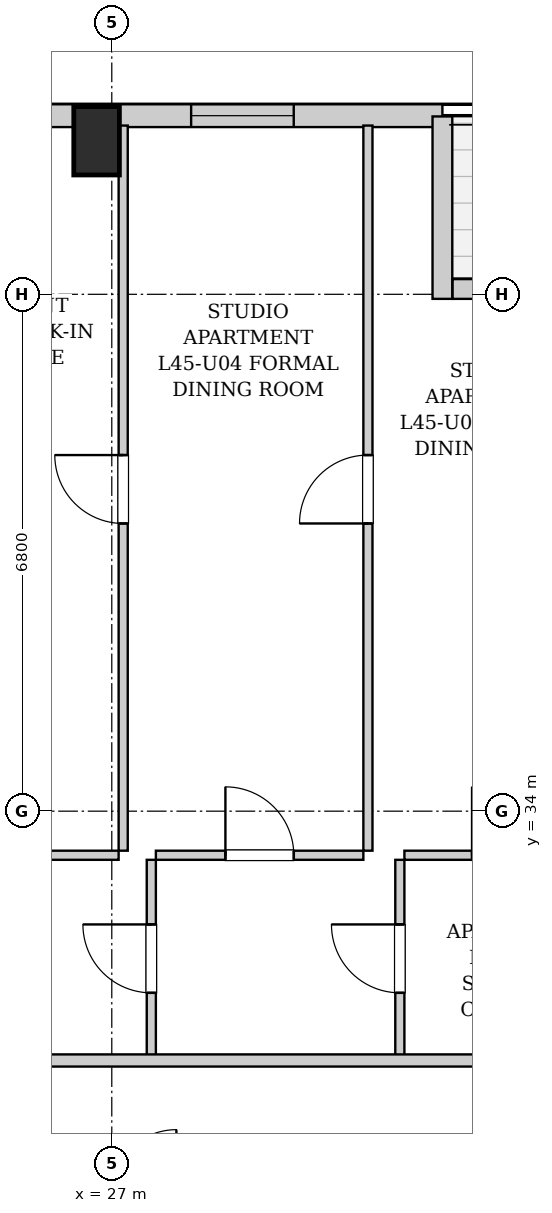
"""IFC4 building model, lengths in metres.
Left out: names, types, materials, properties, quantities, classifications, styles, units other than length and angle.
Written with IfcOpenShell. Run it as: python <this file> out.ifc"""

import sys

from ifc_helpers import new_model, si_unit, direction, frame, frame_2d, origin, origin_2d, place, context, subcontext, project, spatial, rectangle, extrude, element, fill, save


model = new_model("IFC4")
c1 = context("Model", 3, precision=1e-05, world=origin(), true_north=direction((0.0, 1.0)))
c2 = subcontext(c1, "Body", "Model", "MODEL_VIEW")
j1 = project(units=[si_unit("LENGTHUNIT", "METRE"), si_unit("PLANEANGLEUNIT", "RADIAN")], contexts=[c1])
p1 = place(None, origin())
s1 = spatial("IfcSite", under=j1, at=p1, CompositionType="ELEMENT")
p2 = place(p1, origin())
s2 = spatial("IfcBuilding", under=s1, at=p2, CompositionType="ELEMENT")
p3 = place(p2, frame((0.0, 0.0, 156.9)))
s3 = spatial("IfcBuildingStorey", under=s2, at=p3, CompositionType="ELEMENT", Elevation=156.9)
p4 = place(p3, frame((26.8, 42.82, 0.0), z_axis=(0.0, 0.0, 1.0), x_axis=(1.0, 0.0, 0.0)))
e1 = element("IfcColumn", 1, at=p4, inside=s3, PredefinedType="COLUMN", context=c2, shape_type="SweptSolid", body=[
    extrude(rectangle(XDim=0.6, YDim=0.9, at=origin_2d()), origin(), (0.0, 0.0, 1.0), 3.25),
])
p5 = place(p3, frame((10.0, 43.15, 0.0), z_axis=(0.0, 0.0, 1.0), x_axis=(1.0, 0.0, 0.0)))
e2 = element("IfcWall", 2, at=p5, inside=s3, PredefinedType="SOLIDWALL", context=c2, shape_type="SweptSolid", body=[
    extrude(rectangle(XDim=21.35, YDim=0.3, at=frame_2d((10.675, 0.0))), origin(), (0.0, 0.0, 1.0), 2.99),
])
p6 = place(p5, frame((1.956, 0.0, 0.55)))
e3 = element("IfcOpeningElement", 3, at=p6, cuts=e2, PredefinedType="OPENING", context=c2, shape_type="SweptSolid", body=[
    extrude(rectangle(XDim=1.35, YDim=1.2, at=frame_2d((0.675, 0.6))), frame((0.0, 0.16, 0.0), z_axis=(0.0, -1.0, 0.0), x_axis=(1.0, 0.0, 0.0)), (0.0, 0.0, 1.0), 0.32),
])
p7 = place(p5, frame((5.189, 0.0, 0.55)))
e4 = element("IfcOpeningElement", 4, at=p7, cuts=e2, PredefinedType="OPENING", context=c2, shape_type="SweptSolid", body=[
    extrude(rectangle(XDim=1.35, YDim=1.2, at=frame_2d((0.675, 0.6))), frame((0.0, 0.16, 0.0), z_axis=(0.0, -1.0, 0.0), x_axis=(1.0, 0.0, 0.0)), (0.0, 0.0, 1.0), 0.32),
])
p8 = place(p5, frame((8.421, 0.0, 0.55)))
e5 = element("IfcOpeningElement", 5, at=p8, cuts=e2, PredefinedType="OPENING", context=c2, shape_type="SweptSolid", body=[
    extrude(rectangle(XDim=1.35, YDim=1.2, at=frame_2d((0.675, 0.6))), frame((0.0, 0.16, 0.0), z_axis=(0.0, -1.0, 0.0), x_axis=(1.0, 0.0, 0.0)), (0.0, 0.0, 1.0), 0.32),
])
p9 = place(p5, frame((11.15, 0.0, 0.55)))
e6 = element("IfcOpeningElement", 6, at=p9, cuts=e2, PredefinedType="OPENING", context=c2, shape_type="SweptSolid", body=[
    extrude(rectangle(XDim=1.35, YDim=1.2, at=frame_2d((0.675, 0.6))), frame((0.0, 0.16, 0.0), z_axis=(0.0, -1.0, 0.0), x_axis=(1.0, 0.0, 0.0)), (0.0, 0.0, 1.0), 0.32),
])
p10 = place(p5, frame((18.044, 0.0, 0.55)))
e7 = element("IfcOpeningElement", 7, at=p10, cuts=e2, PredefinedType="OPENING", context=c2, shape_type="SweptSolid", body=[
    extrude(rectangle(XDim=1.35, YDim=1.2, at=frame_2d((0.675, 0.6))), frame((0.0, 0.16, 0.0), z_axis=(0.0, -1.0, 0.0), x_axis=(1.0, 0.0, 0.0)), (0.0, 0.0, 1.0), 0.32),
])
p11 = place(p3, frame((31.35, 43.14, 0.0), z_axis=(0.0, 0.0, 1.0), x_axis=(0.0, -1.0, 0.0)))
e8 = element("IfcWall", 8, at=p11, inside=s3, PredefinedType="SOLIDWALL", context=c2, shape_type="SweptSolid", body=[
    extrude(rectangle(XDim=2.4, YDim=0.26, at=frame_2d((1.2, 0.0))), origin(), (0.0, 0.0, 1.0), 2.99),
])
p12 = place(p3, frame((31.484, 40.87, 0.0), z_axis=(0.0, 0.0, 1.0), x_axis=(1.0, 0.0, 0.0)))
e9 = element("IfcWall", 9, at=p12, inside=s3, PredefinedType="SOLIDWALL", context=c2, shape_type="SweptSolid", body=[
    extrude(rectangle(XDim=4.882, YDim=0.26, at=frame_2d((2.441, 0.0))), origin(), (0.0, 0.0, 1.0), 2.99),
])
p13 = place(p12, frame((2.246, 0.0, 0.0)))
e10 = element("IfcOpeningElement", 10, at=p13, cuts=e9, PredefinedType="OPENING", context=c2, shape_type="SweptSolid", body=[
    extrude(rectangle(XDim=1.1, YDim=2.0, at=frame_2d((0.55, 1.0))), frame((0.0, 0.14, 0.0), z_axis=(0.0, -1.0, 0.0), x_axis=(1.0, 0.0, 0.0)), (0.0, 0.0, 1.0), 0.28),
])
p14 = place(p12, frame((0.536, 0.0, 0.55)))
e11 = element("IfcOpeningElement", 11, at=p14, cuts=e9, PredefinedType="OPENING", context=c2, shape_type="SweptSolid", body=[
    extrude(rectangle(XDim=1.35, YDim=1.2, at=frame_2d((0.675, 0.6))), frame((0.0, 0.14, 0.0), z_axis=(0.0, -1.0, 0.0), x_axis=(1.0, 0.0, 0.0)), (0.0, 0.0, 1.0), 0.28),
])
p15 = place(p3, frame((27.52, 30.76, 0.0), z_axis=(0.0, 0.0, 1.0), x_axis=(0.0, 1.0, 0.0)))
e12 = element("IfcWall", 12, at=p15, inside=s3, PredefinedType="PARTITIONING", context=c2, shape_type="SweptSolid", body=[
    extrude(rectangle(XDim=2.6, YDim=0.12, at=frame_2d((1.3, 0.0))), origin(), (0.0, 0.0, 1.0), 2.99),
])
p16 = place(p15, frame((0.85, 0.0, 0.0)))
e13 = element("IfcOpeningElement", 13, at=p16, cuts=e12, PredefinedType="OPENING", context=c2, shape_type="SweptSolid", body=[
    extrude(rectangle(XDim=0.9, YDim=2.05, at=frame_2d((0.45, 1.025))), frame((0.0, 0.07, 0.0), z_axis=(0.0, -1.0, 0.0), x_axis=(1.0, 0.0, 0.0)), (0.0, 0.0, 1.0), 0.14),
])
p17 = place(p3, frame((23.99, 33.42, 0.0), z_axis=(0.0, 0.0, 1.0), x_axis=(1.0, 0.0, 0.0)))
e14 = element("IfcWall", 14, at=p17, inside=s3, PredefinedType="PARTITIONING", context=c2, shape_type="SweptSolid", body=[
    extrude(rectangle(XDim=3.1, YDim=0.12, at=frame_2d((1.55, 0.0))), origin(), (0.0, 0.0, 1.0), 2.99),
])
p18 = place(p17, frame((1.1, 0.0, 0.0)))
e15 = element("IfcOpeningElement", 15, at=p18, cuts=e14, PredefinedType="OPENING", context=c2, shape_type="SweptSolid", body=[
    extrude(rectangle(XDim=0.9, YDim=2.05, at=frame_2d((0.45, 1.025))), frame((0.0, 0.07, 0.0), z_axis=(0.0, -1.0, 0.0), x_axis=(1.0, 0.0, 0.0)), (0.0, 0.0, 1.0), 0.14),
])
p19 = place(p3, frame((30.79, 30.76, 0.0), z_axis=(0.0, 0.0, 1.0), x_axis=(0.0, 1.0, 0.0)))
e16 = element("IfcWall", 16, at=p19, inside=s3, PredefinedType="PARTITIONING", context=c2, shape_type="SweptSolid", body=[
    extrude(rectangle(XDim=2.6, YDim=0.12, at=frame_2d((1.3, 0.0))), origin(), (0.0, 0.0, 1.0), 2.99),
])
p20 = place(p19, frame((0.85, 0.0, 0.0)))
e17 = element("IfcOpeningElement", 17, at=p20, cuts=e16, PredefinedType="OPENING", context=c2, shape_type="SweptSolid", body=[
    extrude(rectangle(XDim=0.9, YDim=2.05, at=frame_2d((0.45, 1.025))), frame((0.0, 0.07, 0.0), z_axis=(0.0, -1.0, 0.0), x_axis=(1.0, 0.0, 0.0)), (0.0, 0.0, 1.0), 0.14),
])
p21 = place(p3, frame((27.58, 33.42, 0.0), z_axis=(0.0, 0.0, 1.0), x_axis=(1.0, 0.0, 0.0)))
e18 = element("IfcWall", 18, at=p21, inside=s3, PredefinedType="PARTITIONING", context=c2, shape_type="SweptSolid", body=[
    extrude(rectangle(XDim=2.73, YDim=0.12, at=frame_2d((1.365, 0.0))), origin(), (0.0, 0.0, 1.0), 2.99),
])
p22 = place(p21, frame((0.915, 0.0, 0.0)))
e19 = element("IfcOpeningElement", 19, at=p22, cuts=e18, PredefinedType="OPENING", context=c2, shape_type="SweptSolid", body=[
    extrude(rectangle(XDim=0.9, YDim=2.05, at=frame_2d((0.45, 1.025))), frame((0.0, 0.07, 0.0), z_axis=(0.0, -1.0, 0.0), x_axis=(1.0, 0.0, 0.0)), (0.0, 0.0, 1.0), 0.14),
])
p23 = place(p3, frame((30.85, 33.42, 0.0), z_axis=(0.0, 0.0, 1.0), x_axis=(1.0, 0.0, 0.0)))
e20 = element("IfcWall", 20, at=p23, inside=s3, PredefinedType="PARTITIONING", context=c2, shape_type="SweptSolid", body=[
    extrude(rectangle(XDim=2.68, YDim=0.12, at=frame_2d((1.34, 0.0))), origin(), (0.0, 0.0, 1.0), 2.99),
])
p24 = place(p23, frame((0.89, 0.0, 0.0)))
e21 = element("IfcOpeningElement", 21, at=p24, cuts=e20, PredefinedType="OPENING", context=c2, shape_type="SweptSolid", body=[
    extrude(rectangle(XDim=0.9, YDim=2.05, at=frame_2d((0.45, 1.025))), frame((0.0, 0.07, 0.0), z_axis=(0.0, -1.0, 0.0), x_axis=(1.0, 0.0, 0.0)), (0.0, 0.0, 1.0), 0.14),
])
p25 = place(p3, frame((27.15, 33.48, 0.0), z_axis=(0.0, 0.0, 1.0), x_axis=(0.0, 1.0, 0.0)))
e22 = element("IfcWall", 22, at=p25, inside=s3, PredefinedType="PARTITIONING", context=c2, shape_type="SweptSolid", body=[
    extrude(rectangle(XDim=9.54, YDim=0.12, at=frame_2d((4.77, 0.0))), origin(), (0.0, 0.0, 1.0), 2.99),
])
p26 = place(p25, frame((4.305, 0.0, 0.0)))
e23 = element("IfcOpeningElement", 23, at=p26, cuts=e22, PredefinedType="OPENING", context=c2, shape_type="SweptSolid", body=[
    extrude(rectangle(XDim=0.9, YDim=2.05, at=frame_2d((0.45, 1.025))), frame((0.0, 0.07, 0.0), z_axis=(0.0, -1.0, 0.0), x_axis=(1.0, 0.0, 0.0)), (0.0, 0.0, 1.0), 0.14),
])
p27 = place(p3, frame((30.37, 33.48, 0.0), z_axis=(0.0, 0.0, 1.0), x_axis=(0.0, 1.0, 0.0)))
e24 = element("IfcWall", 24, at=p27, inside=s3, PredefinedType="PARTITIONING", context=c2, shape_type="SweptSolid", body=[
    extrude(rectangle(XDim=9.54, YDim=0.12, at=frame_2d((4.77, 0.0))), origin(), (0.0, 0.0, 1.0), 2.99),
])
p28 = place(p27, frame((4.305, 0.0, 0.0)))
e25 = element("IfcOpeningElement", 25, at=p28, cuts=e24, PredefinedType="OPENING", context=c2, shape_type="SweptSolid", body=[
    extrude(rectangle(XDim=0.9, YDim=2.05, at=frame_2d((0.45, 1.025))), frame((0.0, 0.07, 0.0), z_axis=(0.0, -1.0, 0.0), x_axis=(1.0, 0.0, 0.0)), (0.0, 0.0, 1.0), 0.14),
])
p29 = place(p3, frame((10.05, 30.72, 0.0), z_axis=(0.0, 0.0, 1.0), x_axis=(1.0, 0.0, 0.0)))
e26 = element("IfcWall", 26, at=p29, inside=s3, PredefinedType="PARTITIONING", context=c2, shape_type="SweptSolid", body=[
    extrude(rectangle(XDim=27.7, YDim=0.16, at=frame_2d((13.85, 0.0))), origin(), (0.0, 0.0, 1.0), 2.99),
])
p30 = place(p29, frame((4.165, 0.0, 0.0)))
e27 = element("IfcOpeningElement", 27, at=p30, cuts=e26, PredefinedType="OPENING", context=c2, shape_type="SweptSolid", body=[
    extrude(rectangle(XDim=0.95, YDim=2.1, at=frame_2d((0.475, 1.05))), frame((0.0, 0.09, 0.0), z_axis=(0.0, -1.0, 0.0), x_axis=(1.0, 0.0, 0.0)), (0.0, 0.0, 1.0), 0.18),
])
p31 = place(p16, origin())
e28 = element("IfcDoor", 28, at=p31, inside=s3, OperationType="SINGLE_SWING_RIGHT", PredefinedType="DOOR", context=c2, shape_type="SweptSolid", body=[
    extrude(rectangle(XDim=0.9, YDim=2.05, at=frame_2d((0.45, 1.025))), frame((0.0, 0.025, 0.0), z_axis=(0.0, -1.0, 0.0), x_axis=(1.0, 0.0, 0.0)), (0.0, 0.0, 1.0), 0.05),
])
fill(e13, e28)
p32 = place(p20, origin())
e29 = element("IfcDoor", 29, at=p32, inside=s3, OperationType="SINGLE_SWING_RIGHT", PredefinedType="DOOR", context=c2, shape_type="SweptSolid", body=[
    extrude(rectangle(XDim=0.9, YDim=2.05, at=frame_2d((0.45, 1.025))), frame((0.0, 0.025, 0.0), z_axis=(0.0, -1.0, 0.0), x_axis=(1.0, 0.0, 0.0)), (0.0, 0.0, 1.0), 0.05),
])
fill(e17, e29)
p33 = place(p22, origin())
e30 = element("IfcDoor", 30, at=p33, inside=s3, OperationType="SINGLE_SWING_LEFT", PredefinedType="DOOR", context=c2, shape_type="SweptSolid", body=[
    extrude(rectangle(XDim=0.9, YDim=2.05, at=frame_2d((0.45, 1.025))), frame((0.0, 0.025, 0.0), z_axis=(0.0, -1.0, 0.0), x_axis=(1.0, 0.0, 0.0)), (0.0, 0.0, 1.0), 0.05),
])
fill(e19, e30)
p34 = place(p26, origin())
e31 = element("IfcDoor", 31, at=p34, inside=s3, OperationType="SINGLE_SWING_RIGHT", PredefinedType="DOOR", context=c2, shape_type="SweptSolid", body=[
    extrude(rectangle(XDim=0.9, YDim=2.05, at=frame_2d((0.45, 1.025))), frame((0.0, 0.025, 0.0), z_axis=(0.0, -1.0, 0.0), x_axis=(1.0, 0.0, 0.0)), (0.0, 0.0, 1.0), 0.05),
])
fill(e23, e31)
p35 = place(p28, origin())
e32 = element("IfcDoor", 32, at=p35, inside=s3, OperationType="SINGLE_SWING_LEFT", PredefinedType="DOOR", context=c2, shape_type="SweptSolid", body=[
    extrude(rectangle(XDim=0.9, YDim=2.05, at=frame_2d((0.45, 1.025))), frame((0.0, 0.025, 0.0), z_axis=(0.0, -1.0, 0.0), x_axis=(1.0, 0.0, 0.0)), (0.0, 0.0, 1.0), 0.05),
])
fill(e25, e32)
p36 = place(p10, origin())
e33 = element("IfcWindow", 33, at=p36, inside=s3, PartitioningType="SINGLE_PANEL", PredefinedType="WINDOW", context=c2, shape_type="SweptSolid", body=[
    extrude(rectangle(XDim=1.35, YDim=1.2, at=frame_2d((0.675, 0.6))), frame((0.0, 0.03, 0.0), z_axis=(0.0, -1.0, 0.0), x_axis=(1.0, 0.0, 0.0)), (0.0, 0.0, 1.0), 0.06),
])
fill(e7, e33)
save(model, sys.argv[1])
